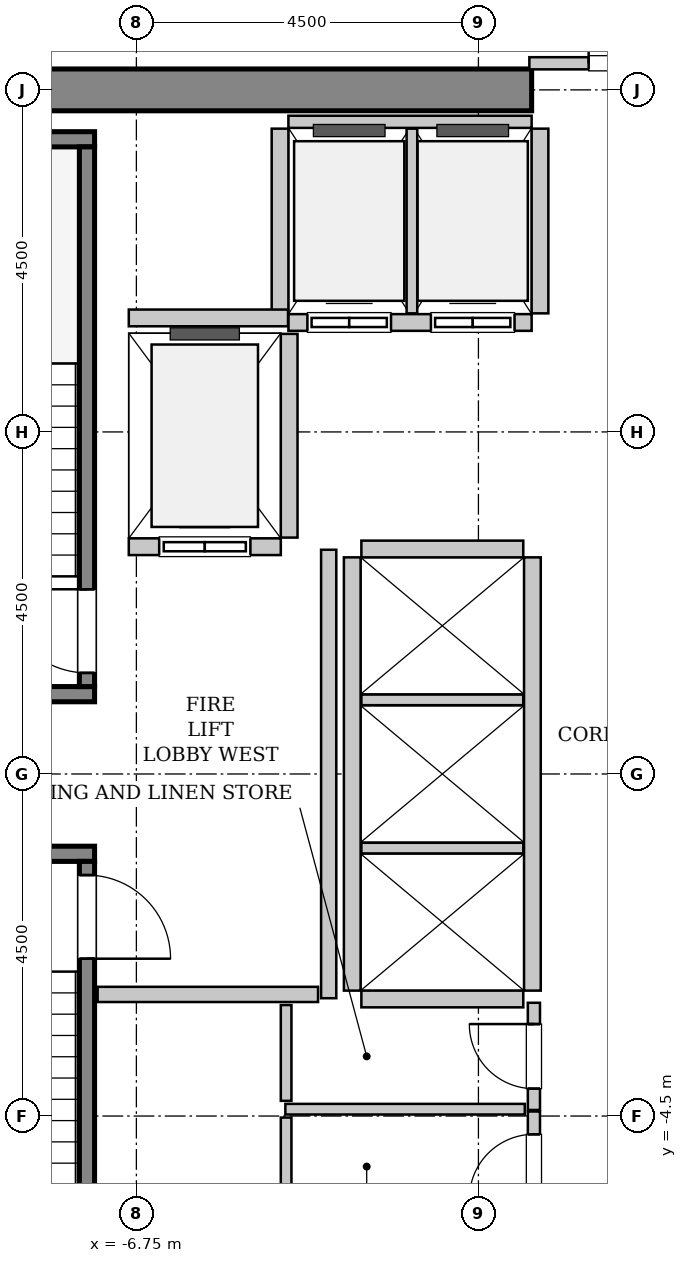
"""IFC4 building model, lengths in metres.
Left out: names, types, materials, properties, quantities, classifications, styles, units other than length and angle.
Written with IfcOpenShell. Run it as: python <this file> out.ifc"""

import sys

from ifc_helpers import new_model, si_unit, direction, frame, frame_2d, origin, place, context, subcontext, project, spatial, rectangle, extrude, source, transform, mapped, element, fill, save


model = new_model("IFC4")
c1 = context("Model", 3, precision=1e-05, world=origin(), true_north=direction((0.0, 1.0)))
c2 = subcontext(c1, "Body", "Model", "MODEL_VIEW")
j1 = project(units=[si_unit("LENGTHUNIT", "METRE"), si_unit("PLANEANGLEUNIT", "RADIAN")], contexts=[c1])
p1 = place(None, origin())
s1 = spatial("IfcSite", under=j1, at=p1, CompositionType="ELEMENT")
p2 = place(p1, origin())
s2 = spatial("IfcBuilding", under=s1, at=p2, CompositionType="ELEMENT")
p3 = place(p2, frame((0.0, 0.0, 140.2)))
s3 = spatial("IfcBuildingStorey", under=s2, at=p3, CompositionType="ELEMENT", Elevation=140.2)
m1 = source(origin(), c2, "Body", "SweptSolid", [
    extrude(rectangle(XDim=9.975, YDim=0.55, at=frame_2d((4.987, 0.0))), origin(), (0.0, 0.0, 1.0), 3.8),
])
p4 = place(p3, frame((-11.525, 9.0, 0.0), z_axis=(0.0, 0.0, 1.0), x_axis=(1.0, 0.0, 0.0)))
e1 = element("IfcWall", 1, at=p4, inside=s3, PredefinedType="SHEAR", context=c2, shape_type="MappedRepresentation", body=[
    mapped(m1, transform((0.0, 0.0, 0.0), x_axis=(1.0, 0.0, 0.0), y_axis=(0.0, 1.0, 0.0), z_axis=(0.0, 0.0, 1.0), scale=1.0)),
])
m2 = source(origin(), c2, "Body", "SweptSolid", [
    extrude(rectangle(XDim=3.4, YDim=0.2, at=frame_2d((1.7, 0.0))), origin(), (0.0, 0.0, 1.0), 3.8),
])
p5 = place(p3, frame((-7.3, 1.05, 0.0), z_axis=(0.0, 0.0, 1.0), x_axis=(-1.0, 0.0, 0.0)))
e2 = element("IfcWall", 2, at=p5, inside=s3, PredefinedType="SOLIDWALL", context=c2, shape_type="MappedRepresentation", body=[
    mapped(m2, transform((0.0, 0.0, 0.0), x_axis=(1.0, 0.0, 0.0), y_axis=(0.0, 1.0, 0.0), z_axis=(0.0, 0.0, 1.0), scale=1.0)),
])
m3 = source(origin(), c2, "Body", "SweptSolid", [
    extrude(rectangle(XDim=3.68, YDim=0.2, at=frame_2d((1.84, 0.0))), origin(), (0.0, 0.0, 1.0), 3.8),
])
p6 = place(p3, frame((-7.3, 8.35, 0.0), z_axis=(0.0, 0.0, 1.0), x_axis=(-1.0, 0.0, 0.0)))
e3 = element("IfcWall", 3, at=p6, inside=s3, PredefinedType="SOLIDWALL", context=c2, shape_type="MappedRepresentation", body=[
    mapped(m3, transform((0.0, 0.0, 0.0), x_axis=(1.0, 0.0, 0.0), y_axis=(0.0, 1.0, 0.0), z_axis=(0.0, 0.0, 1.0), scale=1.0)),
])
m4 = source(origin(), c2, "Body", "SweptSolid", [
    extrude(rectangle(XDim=7.1, YDim=0.2, at=frame_2d((3.55, 0.0))), origin(), (0.0, 0.0, 1.0), 3.8),
])
p7 = place(p3, frame((-7.4, 1.15, 0.0), z_axis=(0.0, 0.0, 1.0), x_axis=(0.0, 1.0, 0.0)))
e4 = element("IfcWall", 4, at=p7, inside=s3, PredefinedType="SOLIDWALL", context=c2, shape_type="MappedRepresentation", body=[
    mapped(m4, transform((0.0, 0.0, 0.0), x_axis=(1.0, 0.0, 0.0), y_axis=(0.0, 1.0, 0.0), z_axis=(0.0, 0.0, 1.0), scale=1.0)),
])
p8 = place(p7, frame((0.18, 0.0, 0.0)))
e5 = element("IfcOpeningElement", 5, at=p8, cuts=e4, PredefinedType="OPENING", context=c2, shape_type="SweptSolid", body=[
    extrude(rectangle(XDim=1.1, YDim=2.15, at=frame_2d((0.55, 1.075))), frame((0.0, 0.11, 0.0), z_axis=(0.0, -1.0, 0.0), x_axis=(1.0, 0.0, 0.0)), (0.0, 0.0, 1.0), 0.22),
])
p9 = place(p3, frame((-10.7, -1.05, 0.0), z_axis=(0.0, 0.0, 1.0), x_axis=(1.0, 0.0, 0.0)))
e6 = element("IfcWall", 6, at=p9, inside=s3, PredefinedType="SOLIDWALL", context=c2, shape_type="MappedRepresentation", body=[
    mapped(m2, transform((0.0, 0.0, 0.0), x_axis=(1.0, 0.0, 0.0), y_axis=(0.0, 1.0, 0.0), z_axis=(0.0, 0.0, 1.0), scale=1.0)),
])
p10 = place(p3, frame((-7.4, -1.15, 0.0), z_axis=(0.0, 0.0, 1.0), x_axis=(0.0, -1.0, 0.0)))
e7 = element("IfcWall", 7, at=p10, inside=s3, PredefinedType="SOLIDWALL", context=c2, shape_type="MappedRepresentation", body=[
    mapped(m4, transform((0.0, 0.0, 0.0), x_axis=(1.0, 0.0, 0.0), y_axis=(0.0, 1.0, 0.0), z_axis=(0.0, 0.0, 1.0), scale=1.0)),
])
p11 = place(p10, frame((0.18, 0.0, 0.0)))
e8 = element("IfcOpeningElement", 8, at=p11, cuts=e7, PredefinedType="OPENING", context=c2, shape_type="SweptSolid", body=[
    extrude(rectangle(XDim=1.1, YDim=2.15, at=frame_2d((0.55, 1.075))), frame((0.0, 0.11, 0.0), z_axis=(0.0, -1.0, 0.0), x_axis=(1.0, 0.0, 0.0)), (0.0, 0.0, 1.0), 0.22),
])
m5 = source(origin(), c2, "Body", "SweptSolid", [
    extrude(rectangle(XDim=2.0, YDim=0.22, at=frame_2d((1.0, 0.0))), origin(), (0.0, 0.0, 1.0), 3.485),
])
p12 = place(p3, frame((-6.85, 2.99, 0.0), z_axis=(0.0, 0.0, 1.0), x_axis=(1.0, 0.0, 0.0)))
e9 = element("IfcWall", 9, at=p12, inside=s3, PredefinedType="SOLIDWALL", context=c2, shape_type="MappedRepresentation", body=[
    mapped(m5, transform((0.0, 0.0, 0.0), x_axis=(1.0, 0.0, 0.0), y_axis=(0.0, 1.0, 0.0), z_axis=(0.0, 0.0, 1.0), scale=1.0)),
])
p13 = place(p12, frame((0.4, 0.0, 0.0)))
e10 = element("IfcOpeningElement", 10, at=p13, cuts=e9, PredefinedType="OPENING", context=c2, shape_type="SweptSolid", body=[
    extrude(rectangle(XDim=1.2, YDim=2.2, at=frame_2d((0.6, 1.1))), frame((0.0, 0.12, 0.0), z_axis=(0.0, -1.0, 0.0), x_axis=(1.0, 0.0, 0.0)), (0.0, 0.0, 1.0), 0.24),
])
m6 = source(origin(), c2, "Body", "SweptSolid", [
    extrude(rectangle(XDim=2.68, YDim=0.22, at=frame_2d((1.34, 0.0))), origin(), (0.0, 0.0, 1.0), 3.485),
])
p14 = place(p3, frame((-4.74, 3.11, 0.0), z_axis=(0.0, 0.0, 1.0), x_axis=(0.0, 1.0, 0.0)))
e11 = element("IfcWall", 11, at=p14, inside=s3, PredefinedType="SOLIDWALL", context=c2, shape_type="MappedRepresentation", body=[
    mapped(m6, transform((0.0, 0.0, 0.0), x_axis=(1.0, 0.0, 0.0), y_axis=(0.0, 1.0, 0.0), z_axis=(0.0, 0.0, 1.0), scale=1.0)),
])
m7 = source(origin(), c2, "Body", "SweptSolid", [
    extrude(rectangle(XDim=3.2, YDim=0.22, at=frame_2d((1.6, 0.0))), origin(), (0.0, 0.0, 1.0), 3.485),
])
p15 = place(p3, frame((-4.75, 5.94, 0.0), z_axis=(0.0, 0.0, 1.0), x_axis=(1.0, 0.0, 0.0)))
e12 = element("IfcWall", 12, at=p15, inside=s3, PredefinedType="SOLIDWALL", context=c2, shape_type="MappedRepresentation", body=[
    mapped(m7, transform((0.0, 0.0, 0.0), x_axis=(1.0, 0.0, 0.0), y_axis=(0.0, 1.0, 0.0), z_axis=(0.0, 0.0, 1.0), scale=1.0)),
])
p16 = place(p15, frame((0.25, 0.0, 0.0)))
e13 = element("IfcOpeningElement", 13, at=p16, cuts=e12, PredefinedType="OPENING", context=c2, shape_type="SweptSolid", body=[
    extrude(rectangle(XDim=1.1, YDim=2.2, at=frame_2d((0.55, 1.1))), frame((0.0, 0.12, 0.0), z_axis=(0.0, -1.0, 0.0), x_axis=(1.0, 0.0, 0.0)), (0.0, 0.0, 1.0), 0.24),
])
p17 = place(p15, frame((1.875, 0.0, 0.0)))
e14 = element("IfcOpeningElement", 14, at=p17, cuts=e12, PredefinedType="OPENING", context=c2, shape_type="SweptSolid", body=[
    extrude(rectangle(XDim=1.1, YDim=2.2, at=frame_2d((0.55, 1.1))), frame((0.0, 0.12, 0.0), z_axis=(0.0, -1.0, 0.0), x_axis=(1.0, 0.0, 0.0)), (0.0, 0.0, 1.0), 0.24),
])
m8 = source(origin(), c2, "Body", "SweptSolid", [
    extrude(rectangle(XDim=3.2, YDim=0.16, at=frame_2d((1.6, 0.0))), origin(), (0.0, 0.0, 1.0), 2.375),
])
p18 = place(p3, frame((-1.55, 8.58, 0.0), z_axis=(0.0, 0.0, 1.0), x_axis=(-1.0, 0.0, 0.0)))
e15 = element("IfcWall", 15, at=p18, inside=s3, PredefinedType="PARTITIONING", context=c2, shape_type="MappedRepresentation", body=[
    mapped(m8, transform((0.0, 0.0, 0.0), x_axis=(1.0, 0.0, 0.0), y_axis=(0.0, 1.0, 0.0), z_axis=(0.0, 0.0, 1.0), scale=1.0)),
])
m9 = source(origin(), c2, "Body", "SweptSolid", [
    extrude(rectangle(XDim=2.43, YDim=0.22, at=frame_2d((1.215, 0.0))), origin(), (0.0, 0.0, 1.0), 3.485),
])
p19 = place(p3, frame((-4.86, 8.49, 0.0), z_axis=(0.0, 0.0, 1.0), x_axis=(0.0, -1.0, 0.0)))
e16 = element("IfcWall", 16, at=p19, inside=s3, PredefinedType="SOLIDWALL", context=c2, shape_type="MappedRepresentation", body=[
    mapped(m9, transform((0.0, 0.0, 0.0), x_axis=(1.0, 0.0, 0.0), y_axis=(0.0, 1.0, 0.0), z_axis=(0.0, 0.0, 1.0), scale=1.0)),
])
m10 = source(origin(), c2, "Body", "SweptSolid", [
    extrude(rectangle(XDim=2.43, YDim=0.14, at=frame_2d((1.215, 0.0))), origin(), (0.0, 0.0, 1.0), 3.485),
])
p20 = place(p3, frame((-3.125, 6.06, 0.0), z_axis=(0.0, 0.0, 1.0), x_axis=(0.0, 1.0, 0.0)))
e17 = element("IfcWall", 17, at=p20, inside=s3, PredefinedType="PARTITIONING", context=c2, shape_type="MappedRepresentation", body=[
    mapped(m10, transform((0.0, 0.0, 0.0), x_axis=(1.0, 0.0, 0.0), y_axis=(0.0, 1.0, 0.0), z_axis=(0.0, 0.0, 1.0), scale=1.0)),
])
p21 = place(p3, frame((-1.44, 6.06, 0.0), z_axis=(0.0, 0.0, 1.0), x_axis=(0.0, 1.0, 0.0)))
e18 = element("IfcWall", 18, at=p21, inside=s3, PredefinedType="SOLIDWALL", context=c2, shape_type="MappedRepresentation", body=[
    mapped(m9, transform((0.0, 0.0, 0.0), x_axis=(1.0, 0.0, 0.0), y_axis=(0.0, 1.0, 0.0), z_axis=(0.0, 0.0, 1.0), scale=1.0)),
])
m11 = source(origin(), c2, "Body", "SweptSolid", [
    extrude(rectangle(XDim=5.7, YDim=0.22, at=frame_2d((2.85, 0.0))), origin(), (0.0, 0.0, 1.0), 3.485),
])
for number, where, z_axis, x_axis in (
    (19, (-1.54, -2.85, 0.0), (0.0, 0.0, 1.0), (0.0, 1.0, 0.0)),
    (20, (-3.91, 2.85, 0.0), (0.0, 0.0, 1.0), (0.0, -1.0, 0.0)),
):
    element("IfcWall", number, at=place(p3, frame(where, z_axis=z_axis, x_axis=x_axis)), inside=s3, PredefinedType="SOLIDWALL", context=c2, shape_type="MappedRepresentation", body=[
        mapped(m11, transform((0.0, 0.0, 0.0), x_axis=(1.0, 0.0, 0.0), y_axis=(0.0, 1.0, 0.0), z_axis=(0.0, 0.0, 1.0), scale=1.0)),
    ])
m12 = source(origin(), c2, "Body", "SweptSolid", [
    extrude(rectangle(XDim=2.13, YDim=0.22, at=frame_2d((1.065, 0.0))), origin(), (0.0, 0.0, 1.0), 3.485),
])
p22 = place(p3, frame((-3.79, -2.96, 0.0), z_axis=(0.0, 0.0, 1.0), x_axis=(1.0, 0.0, 0.0)))
e21 = element("IfcWall", 21, at=p22, inside=s3, PredefinedType="SOLIDWALL", context=c2, shape_type="MappedRepresentation", body=[
    mapped(m12, transform((0.0, 0.0, 0.0), x_axis=(1.0, 0.0, 0.0), y_axis=(0.0, 1.0, 0.0), z_axis=(0.0, 0.0, 1.0), scale=1.0)),
])
m13 = source(origin(), c2, "Body", "SweptSolid", [
    extrude(rectangle(XDim=2.13, YDim=0.14, at=frame_2d((1.065, 0.0))), origin(), (0.0, 0.0, 1.0), 3.485),
])
for number, where, z_axis, x_axis in (
    (22, (-3.79, -0.975, 0.0), (0.0, 0.0, 1.0), (1.0, 0.0, 0.0)),
    (23, (-3.79, 0.975, 0.0), (0.0, 0.0, 1.0), (1.0, 0.0, 0.0)),
):
    element("IfcWall", number, at=place(p3, frame(where, z_axis=z_axis, x_axis=x_axis)), inside=s3, PredefinedType="PARTITIONING", context=c2, shape_type="MappedRepresentation", body=[
        mapped(m13, transform((0.0, 0.0, 0.0), x_axis=(1.0, 0.0, 0.0), y_axis=(0.0, 1.0, 0.0), z_axis=(0.0, 0.0, 1.0), scale=1.0)),
    ])
p23 = place(p3, frame((-1.66, 2.96, 0.0), z_axis=(0.0, 0.0, 1.0), x_axis=(-1.0, 0.0, 0.0)))
e24 = element("IfcWall", 24, at=p23, inside=s3, PredefinedType="SOLIDWALL", context=c2, shape_type="MappedRepresentation", body=[
    mapped(m12, transform((0.0, 0.0, 0.0), x_axis=(1.0, 0.0, 0.0), y_axis=(0.0, 1.0, 0.0), z_axis=(0.0, 0.0, 1.0), scale=1.0)),
])
m14 = source(origin(), c2, "Body", "SweptSolid", [
    extrude(rectangle(XDim=2.095, YDim=0.22, at=frame_2d((1.048, 0.0))), origin(), (0.0, 0.0, 1.0), 3.485),
])
p24 = place(p3, frame((-6.85, 6.0, 0.0), z_axis=(0.0, 0.0, 1.0), x_axis=(1.0, 0.0, 0.0)))
e25 = element("IfcWall", 25, at=p24, inside=s3, PredefinedType="SOLIDWALL", context=c2, shape_type="MappedRepresentation", body=[
    mapped(m14, transform((0.0, 0.0, 0.0), x_axis=(1.0, 0.0, 0.0), y_axis=(0.0, 1.0, 0.0), z_axis=(0.0, 0.0, 1.0), scale=1.0)),
])
m15 = source(origin(), c2, "Body", "SweptSolid", [
    extrude(rectangle(XDim=5.9, YDim=0.2, at=frame_2d((2.95, 0.0))), origin(), (0.0, 0.0, 1.0), 3.485),
])
p25 = place(p3, frame((-4.22, -2.95, 0.0), z_axis=(0.0, 0.0, 1.0), x_axis=(0.0, 1.0, 0.0)))
e26 = element("IfcWall", 26, at=p25, inside=s3, PredefinedType="PARTITIONING", context=c2, shape_type="MappedRepresentation", body=[
    mapped(m15, transform((0.0, 0.0, 0.0), x_axis=(1.0, 0.0, 0.0), y_axis=(0.0, 1.0, 0.0), z_axis=(0.0, 0.0, 1.0), scale=1.0)),
])
m16 = source(origin(), c2, "Body", "SweptSolid", [
    extrude(rectangle(XDim=2.9, YDim=0.2, at=frame_2d((1.45, 0.0))), origin(), (0.0, 0.0, 1.0), 3.485),
])
p26 = place(p3, frame((-7.26, -2.9, 0.0), z_axis=(0.0, 0.0, 1.0), x_axis=(1.0, 0.0, 0.0)))
e27 = element("IfcWall", 27, at=p26, inside=s3, PredefinedType="PARTITIONING", context=c2, shape_type="MappedRepresentation", body=[
    mapped(m16, transform((0.0, 0.0, 0.0), x_axis=(1.0, 0.0, 0.0), y_axis=(0.0, 1.0, 0.0), z_axis=(0.0, 0.0, 1.0), scale=1.0)),
])
m17 = source(origin(), c2, "Body", "SweptSolid", [
    extrude(rectangle(XDim=3.16, YDim=0.16, at=frame_2d((1.58, 0.0))), origin(), (0.0, 0.0, 1.0), 2.375),
])
p27 = place(p3, frame((-1.58, 9.35, 0.0), z_axis=(0.0, 0.0, 1.0), x_axis=(1.0, 0.0, 0.0)))
e28 = element("IfcWall", 28, at=p27, inside=s3, PredefinedType="PARTITIONING", context=c2, shape_type="MappedRepresentation", body=[
    mapped(m17, transform((0.0, 0.0, 0.0), x_axis=(1.0, 0.0, 0.0), y_axis=(0.0, 1.0, 0.0), z_axis=(0.0, 0.0, 1.0), scale=1.0)),
])
p28 = place(p27, frame((0.78, 0.0, 0.0)))
e29 = element("IfcOpeningElement", 29, at=p28, cuts=e28, PredefinedType="OPENING", context=c2, shape_type="SweptSolid", body=[
    extrude(rectangle(XDim=1.6, YDim=2.3, at=frame_2d((0.8, 1.15))), frame((0.0, 0.09, 0.0), z_axis=(0.0, -1.0, 0.0), x_axis=(1.0, 0.0, 0.0)), (0.0, 0.0, 1.0), 0.18),
])
m18 = source(origin(), c2, "Body", "SweptSolid", [
    extrude(rectangle(XDim=1.41, YDim=0.16, at=frame_2d((0.705, 0.0))), origin(), (0.0, 0.0, 1.0), 3.485),
])
p29 = place(p3, frame((-1.52, -4.42, 0.0), z_axis=(0.0, 0.0, 1.0), x_axis=(0.0, 1.0, 0.0)))
e30 = element("IfcWall", 30, at=p29, inside=s3, PredefinedType="PARTITIONING", context=c2, shape_type="MappedRepresentation", body=[
    mapped(m18, transform((0.0, 0.0, 0.0), x_axis=(1.0, 0.0, 0.0), y_axis=(0.0, 1.0, 0.0), z_axis=(0.0, 0.0, 1.0), scale=1.0)),
])
p30 = place(p29, frame((0.28, 0.0, 0.0)))
e31 = element("IfcOpeningElement", 31, at=p30, cuts=e30, PredefinedType="OPENING", context=c2, shape_type="SweptSolid", body=[
    extrude(rectangle(XDim=0.85, YDim=2.1, at=frame_2d((0.425, 1.05))), frame((0.0, 0.09, 0.0), z_axis=(0.0, -1.0, 0.0), x_axis=(1.0, 0.0, 0.0)), (0.0, 0.0, 1.0), 0.18),
])
m19 = source(origin(), c2, "Body", "SweptSolid", [
    extrude(rectangle(XDim=3.15, YDim=0.14, at=frame_2d((1.575, 0.0))), origin(), (0.0, 0.0, 1.0), 3.485),
])
p31 = place(p3, frame((-4.79, -4.41, 0.0), z_axis=(0.0, 0.0, 1.0), x_axis=(1.0, 0.0, 0.0)))
e32 = element("IfcWall", 32, at=p31, inside=s3, PredefinedType="PARTITIONING", context=c2, shape_type="MappedRepresentation", body=[
    mapped(m19, transform((0.0, 0.0, 0.0), x_axis=(1.0, 0.0, 0.0), y_axis=(0.0, 1.0, 0.0), z_axis=(0.0, 0.0, 1.0), scale=1.0)),
])
m20 = source(origin(), c2, "Body", "SweptSolid", [
    extrude(rectangle(XDim=1.26, YDim=0.14, at=frame_2d((0.63, 0.0))), origin(), (0.0, 0.0, 1.0), 3.485),
])
p32 = place(p3, frame((-4.78, -4.3, 0.0), z_axis=(0.0, 0.0, 1.0), x_axis=(0.0, 1.0, 0.0)))
e33 = element("IfcWall", 33, at=p32, inside=s3, PredefinedType="PARTITIONING", context=c2, shape_type="MappedRepresentation", body=[
    mapped(m20, transform((0.0, 0.0, 0.0), x_axis=(1.0, 0.0, 0.0), y_axis=(0.0, 1.0, 0.0), z_axis=(0.0, 0.0, 1.0), scale=1.0)),
])
m21 = source(origin(), c2, "Body", "SweptSolid", [
    extrude(rectangle(XDim=1.45, YDim=0.16, at=frame_2d((0.725, 0.0))), origin(), (0.0, 0.0, 1.0), 3.485),
])
p33 = place(p3, frame((-1.52, -5.89, 0.0), z_axis=(0.0, 0.0, 1.0), x_axis=(0.0, 1.0, 0.0)))
e34 = element("IfcWall", 34, at=p33, inside=s3, PredefinedType="PARTITIONING", context=c2, shape_type="MappedRepresentation", body=[
    mapped(m21, transform((0.0, 0.0, 0.0), x_axis=(1.0, 0.0, 0.0), y_axis=(0.0, 1.0, 0.0), z_axis=(0.0, 0.0, 1.0), scale=1.0)),
])
p34 = place(p33, frame((0.3, 0.0, 0.0)))
e35 = element("IfcOpeningElement", 35, at=p34, cuts=e34, PredefinedType="OPENING", context=c2, shape_type="SweptSolid", body=[
    extrude(rectangle(XDim=0.85, YDim=2.1, at=frame_2d((0.425, 1.05))), frame((0.0, 0.09, 0.0), z_axis=(0.0, -1.0, 0.0), x_axis=(1.0, 0.0, 0.0)), (0.0, 0.0, 1.0), 0.18),
])
m22 = source(origin(), c2, "Body", "SweptSolid", [
    extrude(rectangle(XDim=1.37, YDim=0.14, at=frame_2d((0.685, 0.0))), origin(), (0.0, 0.0, 1.0), 3.485),
])
p35 = place(p3, frame((-4.78, -5.89, 0.0), z_axis=(0.0, 0.0, 1.0), x_axis=(0.0, 1.0, 0.0)))
e36 = element("IfcWall", 36, at=p35, inside=s3, PredefinedType="PARTITIONING", context=c2, shape_type="MappedRepresentation", body=[
    mapped(m22, transform((0.0, 0.0, 0.0), x_axis=(1.0, 0.0, 0.0), y_axis=(0.0, 1.0, 0.0), z_axis=(0.0, 0.0, 1.0), scale=1.0)),
])
m23 = source(origin(), c2, "Body", "SweptSolid", [
    extrude(rectangle(XDim=1.1, YDim=2.15, at=frame_2d((0.55, 1.075))), frame((0.0, 0.025, 0.0), z_axis=(0.0, -1.0, 0.0), x_axis=(1.0, 0.0, 0.0)), (0.0, 0.0, 1.0), 0.05),
])
p36 = place(p8, origin())
e37 = element("IfcDoor", 37, at=p36, inside=s3, OperationType="SINGLE_SWING_RIGHT", PredefinedType="DOOR", context=c2, shape_type="MappedRepresentation", body=[
    mapped(m23, transform((0.0, 0.0, 0.0), x_axis=(1.0, 0.0, 0.0), y_axis=(0.0, 1.0, 0.0), z_axis=(0.0, 0.0, 1.0), scale=1.0)),
])
fill(e5, e37)
p37 = place(p11, origin())
e38 = element("IfcDoor", 38, at=p37, inside=s3, OperationType="SINGLE_SWING_RIGHT", PredefinedType="DOOR", context=c2, shape_type="MappedRepresentation", body=[
    mapped(m23, transform((0.0, 0.0, 0.0), x_axis=(1.0, 0.0, 0.0), y_axis=(0.0, 1.0, 0.0), z_axis=(0.0, 0.0, 1.0), scale=1.0)),
])
fill(e8, e38)
m24 = source(origin(), c2, "Body", "SweptSolid", [
    extrude(rectangle(XDim=1.2, YDim=2.2, at=frame_2d((0.6, 1.1))), frame((0.0, 0.025, 0.0), z_axis=(0.0, -1.0, 0.0), x_axis=(1.0, 0.0, 0.0)), (0.0, 0.0, 1.0), 0.05),
])
p38 = place(p13, origin())
e39 = element("IfcDoor", 39, at=p38, inside=s3, OperationType="SLIDING_TO_LEFT", PredefinedType="DOOR", context=c2, shape_type="MappedRepresentation", body=[
    mapped(m24, transform((0.0, 0.0, 0.0), x_axis=(1.0, 0.0, 0.0), y_axis=(0.0, 1.0, 0.0), z_axis=(0.0, 0.0, 1.0), scale=1.0)),
])
fill(e10, e39)
m25 = source(origin(), c2, "Body", "SweptSolid", [
    extrude(rectangle(XDim=1.1, YDim=2.2, at=frame_2d((0.55, 1.1))), frame((0.0, 0.025, 0.0), z_axis=(0.0, -1.0, 0.0), x_axis=(1.0, 0.0, 0.0)), (0.0, 0.0, 1.0), 0.05),
])
p39 = place(p16, origin())
e40 = element("IfcDoor", 40, at=p39, inside=s3, OperationType="DOUBLE_DOOR_SLIDING", PredefinedType="DOOR", context=c2, shape_type="MappedRepresentation", body=[
    mapped(m25, transform((0.0, 0.0, 0.0), x_axis=(1.0, 0.0, 0.0), y_axis=(0.0, 1.0, 0.0), z_axis=(0.0, 0.0, 1.0), scale=1.0)),
])
fill(e13, e40)
p40 = place(p17, origin())
e41 = element("IfcDoor", 41, at=p40, inside=s3, OperationType="DOUBLE_DOOR_SLIDING", PredefinedType="DOOR", context=c2, shape_type="MappedRepresentation", body=[
    mapped(m25, transform((0.0, 0.0, 0.0), x_axis=(1.0, 0.0, 0.0), y_axis=(0.0, 1.0, 0.0), z_axis=(0.0, 0.0, 1.0), scale=1.0)),
])
fill(e14, e41)
m26 = source(origin(), c2, "Body", "SweptSolid", [
    extrude(rectangle(XDim=1.6, YDim=2.3, at=frame_2d((0.8, 1.15))), frame((0.0, 0.025, 0.0), z_axis=(0.0, -1.0, 0.0), x_axis=(1.0, 0.0, 0.0)), (0.0, 0.0, 1.0), 0.05),
])
p41 = place(p28, origin())
e42 = element("IfcDoor", 42, at=p41, inside=s3, OperationType="DOUBLE_DOOR_SINGLE_SWING", PredefinedType="DOOR", context=c2, shape_type="MappedRepresentation", body=[
    mapped(m26, transform((0.0, 0.0, 0.0), x_axis=(1.0, 0.0, 0.0), y_axis=(0.0, 1.0, 0.0), z_axis=(0.0, 0.0, 1.0), scale=1.0)),
])
fill(e29, e42)
m27 = source(origin(), c2, "Body", "SweptSolid", [
    extrude(rectangle(XDim=0.85, YDim=2.1, at=frame_2d((0.425, 1.05))), frame((0.0, 0.025, 0.0), z_axis=(0.0, -1.0, 0.0), x_axis=(1.0, 0.0, 0.0)), (0.0, 0.0, 1.0), 0.05),
])
p42 = place(p30, origin())
e43 = element("IfcDoor", 43, at=p42, inside=s3, OperationType="SINGLE_SWING_RIGHT", PredefinedType="DOOR", context=c2, shape_type="MappedRepresentation", body=[
    mapped(m27, transform((0.0, 0.0, 0.0), x_axis=(1.0, 0.0, 0.0), y_axis=(0.0, 1.0, 0.0), z_axis=(0.0, 0.0, 1.0), scale=1.0)),
])
fill(e31, e43)
p43 = place(p34, origin())
e44 = element("IfcDoor", 44, at=p43, inside=s3, OperationType="SINGLE_SWING_LEFT", PredefinedType="DOOR", context=c2, shape_type="MappedRepresentation", body=[
    mapped(m27, transform((0.0, 0.0, 0.0), x_axis=(1.0, 0.0, 0.0), y_axis=(0.0, 1.0, 0.0), z_axis=(0.0, 0.0, 1.0), scale=1.0)),
])
fill(e35, e44)
save(model, sys.argv[1])
